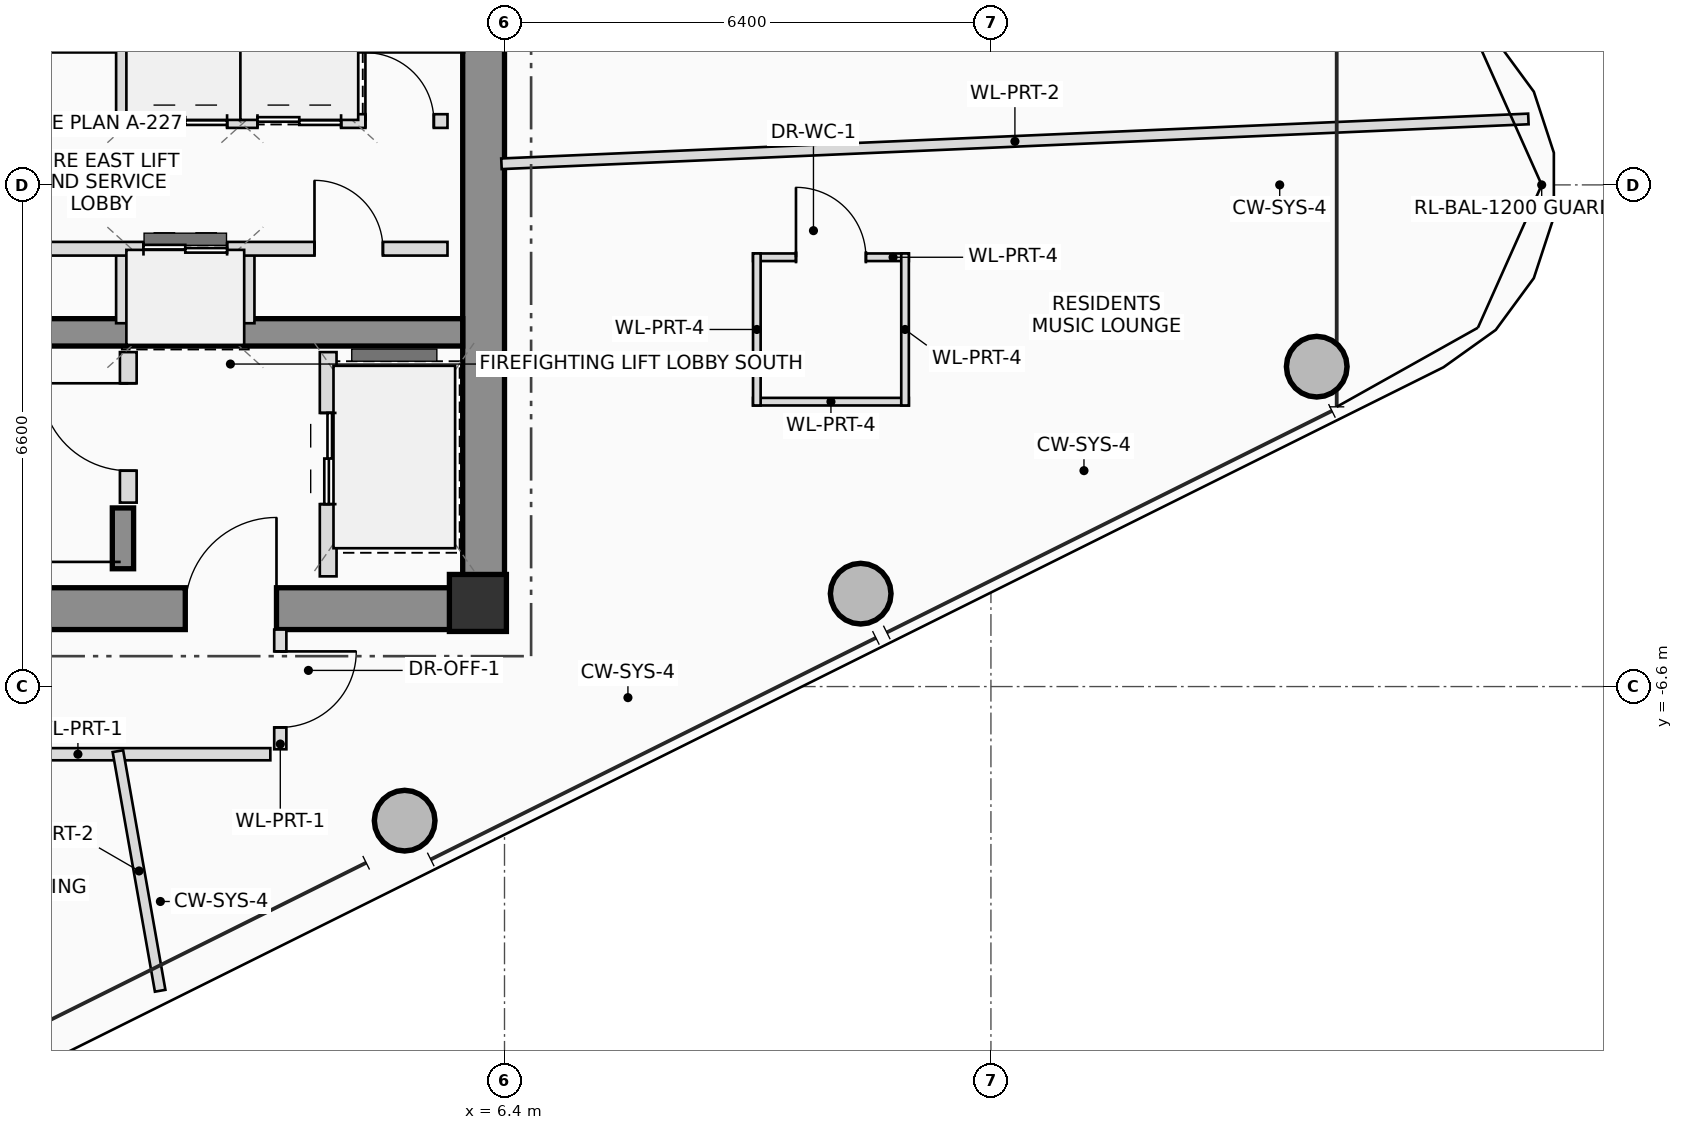
"""IFC4 building model, lengths in metres.
Left out: names, types, materials, properties, quantities, classifications, styles, units other than length and angle.
Written with IfcOpenShell. Run it as: python <this file> out.ifc"""

import sys

from ifc_helpers import new_model, si_unit, direction, frame, frame_2d, origin, origin_2d, place, context, subcontext, project, spatial, rectangle, hollow_circle, extrude, source, transform, mapped, element, fill, save


model = new_model("IFC4")
c1 = context("Model", 3, precision=1e-05, world=origin(), true_north=direction((0.0, 1.0)))
c2 = subcontext(c1, "Body", "Model", "MODEL_VIEW")
j1 = project(units=[si_unit("LENGTHUNIT", "METRE"), si_unit("PLANEANGLEUNIT", "RADIAN")], contexts=[c1])
p1 = place(None, origin())
s1 = spatial("IfcSite", under=j1, at=p1, CompositionType="ELEMENT")
p2 = place(p1, origin())
s2 = spatial("IfcBuilding", under=s1, at=p2, CompositionType="ELEMENT")
p3 = place(p2, frame((0.0, 0.0, 300.2)))
s3 = spatial("IfcBuildingStorey", under=s2, at=p3, CompositionType="ELEMENT", Elevation=300.2)
m1 = source(origin(), c2, "Body", "SweptSolid", [
    extrude(rectangle(XDim=0.75, YDim=0.75, at=origin_2d()), origin(), (0.0, 0.0, 1.0), 3.45),
])
p4 = place(p3, frame((6.05, -5.5, 0.0), z_axis=(0.0, 0.0, 1.0), x_axis=(1.0, 0.0, 0.0)))
e1 = element("IfcColumn", 1, at=p4, inside=s3, PredefinedType="COLUMN", context=c2, shape_type="MappedRepresentation", body=[
    mapped(m1, transform((0.0, 0.0, 0.0), scale=1.0)),
])
p5 = place(p3, frame((-6.4, -5.575, 0.0), z_axis=(0.0, 0.0, 1.0), x_axis=(1.0, 0.0, 0.0)))
e2 = element("IfcWall", 2, at=p5, inside=s3, PredefinedType="SHEAR", context=c2, shape_type="SweptSolid", body=[
    extrude(rectangle(XDim=12.8, YDim=0.55, at=frame_2d((6.4, 0.0))), origin(), (0.0, 0.0, 1.0), 3.45),
])
p6 = place(p5, frame((8.6, 0.0, 0.0)))
e3 = element("IfcOpeningElement", 3, at=p6, cuts=e2, PredefinedType="OPENING", context=c2, shape_type="SweptSolid", body=[
    extrude(rectangle(XDim=1.2, YDim=2.2, at=frame_2d((0.6, 1.1))), frame((0.0, 0.285, 0.0), z_axis=(0.0, -1.0, 0.0), x_axis=(1.0, 0.0, 0.0)), (0.0, 0.0, 1.0), 0.57),
])
p7 = place(p3, frame((6.125, -5.3, 0.0), z_axis=(0.0, 0.0, 1.0), x_axis=(0.0, 1.0, 0.0)))
e4 = element("IfcWall", 4, at=p7, inside=s3, PredefinedType="SHEAR", context=c2, shape_type="SweptSolid", body=[
    extrude(rectangle(XDim=10.6, YDim=0.55, at=frame_2d((5.3, 0.0))), origin(), (0.0, 0.0, 1.0), 3.45),
])
p8 = place(p3, frame((-5.85, -1.94, 0.0), z_axis=(0.0, 0.0, 1.0), x_axis=(1.0, 0.0, 0.0)))
e5 = element("IfcWall", 5, at=p8, inside=s3, PredefinedType="SHEAR", context=c2, shape_type="SweptSolid", body=[
    extrude(rectangle(XDim=11.7, YDim=0.36, at=frame_2d((5.85, 0.0))), origin(), (0.0, 0.0, 1.0), 3.45),
])
p9 = place(p3, frame((1.38, -5.05, 0.0), z_axis=(0.0, 0.0, 1.0), x_axis=(0.0, 1.0, 0.0)))
e6 = element("IfcWall", 6, at=p9, inside=s3, PredefinedType="SHEAR", context=c2, shape_type="SweptSolid", body=[
    extrude(rectangle(XDim=0.8, YDim=0.28, at=frame_2d((0.4, 0.0))), origin(), (0.0, 0.0, 1.0), 3.45),
])
m2 = source(origin(), c2, "Body", "SweptSolid", [
    extrude(hollow_circle(Radius=0.4, WallThickness=0.028, at=origin_2d()), origin(), (0.0, 0.0, 1.0), 3.45),
])
for number, where, z_axis, x_axis in (
    (7, (5.086, -8.364, 0.0), (0.0, 0.0, 1.0), (1.0, 0.0, 0.0)),
    (8, (11.086, -5.378, 0.0), (0.0, 0.0, 1.0), (1.0, 0.0, 0.0)),
    (9, (17.087, -2.392, 0.0), (0.0, 0.0, 1.0), (1.0, 0.0, 0.0)),
):
    element("IfcColumn", number, at=place(p3, frame(where, z_axis=z_axis, x_axis=x_axis)), inside=s3, PredefinedType="COLUMN", context=c2, shape_type="MappedRepresentation", body=[
        mapped(m2, transform((0.0, 0.0, 0.0), scale=1.0)),
    ])
p10 = place(p3, frame((1.45, -4.18, 0.0), z_axis=(0.0, 0.0, 1.0), x_axis=(0.0, 1.0, 0.0)))
e10 = element("IfcWall", 10, at=p10, inside=s3, PredefinedType="PLUMBINGWALL", context=c2, shape_type="SweptSolid", body=[
    extrude(rectangle(XDim=1.98, YDim=0.22, at=frame_2d((0.99, 0.0))), origin(), (0.0, 0.0, 1.0), 3.25),
])
p11 = place(p10, frame((0.42, 0.0, 0.0)))
e11 = element("IfcOpeningElement", 11, at=p11, cuts=e10, PredefinedType="OPENING", context=c2, shape_type="SweptSolid", body=[
    extrude(rectangle(XDim=1.15, YDim=2.15, at=frame_2d((0.575, 1.075))), frame((0.0, 0.12, 0.0), z_axis=(0.0, -1.0, 0.0), x_axis=(1.0, 0.0, 0.0)), (0.0, 0.0, 1.0), 0.24),
])
p12 = place(p3, frame((4.08, -5.15, 0.0), z_axis=(0.0, 0.0, 1.0), x_axis=(0.0, 1.0, 0.0)))
e12 = element("IfcWall", 12, at=p12, inside=s3, PredefinedType="PLUMBINGWALL", context=c2, shape_type="SweptSolid", body=[
    extrude(rectangle(XDim=2.95, YDim=0.22, at=frame_2d((1.475, 0.0))), origin(), (0.0, 0.0, 1.0), 3.25),
])
p13 = place(p12, frame((0.95, 0.0, 0.0)))
e13 = element("IfcOpeningElement", 13, at=p13, cuts=e12, PredefinedType="OPENING", context=c2, shape_type="SweptSolid", body=[
    extrude(rectangle(XDim=1.2, YDim=2.25, at=frame_2d((0.6, 1.125))), frame((0.0, 0.12, 0.0), z_axis=(0.0, -1.0, 0.0), x_axis=(1.0, 0.0, 0.0)), (0.0, 0.0, 1.0), 0.24),
])
for number, where, z_axis, x_axis in (
    (14, (1.38, 0.84, 0.0), (0.0, 0.0, 1.0), (0.0, 1.0, 0.0)),
    (15, (1.38, -1.82, 0.0), (0.0, 0.0, 1.0), (0.0, 1.0, 0.0)),
    (16, (3.02, 0.84, 0.0), (0.0, 0.0, 1.0), (0.0, 1.0, 0.0)),
    (17, (4.38, 0.84, 0.0), (0.0, 0.0, 1.0), (0.0, 1.0, 0.0)),
    (18, (3.02, -1.82, 0.0), (0.0, 0.0, 1.0), (0.0, 1.0, 0.0)),
):
    element("IfcWall", number, at=place(p3, frame(where, z_axis=z_axis, x_axis=x_axis)), inside=s3, PredefinedType="PLUMBINGWALL", context=c2, shape_type="SweptSolid", body=[
        extrude(rectangle(XDim=0.98, YDim=0.18, at=frame_2d((0.49, 0.0))), origin(), (0.0, 0.0, 1.0), 3.25),
    ])
p14 = place(p3, frame((-5.68, 0.84, 0.0), z_axis=(0.0, 0.0, 1.0), x_axis=(1.0, 0.0, 0.0)))
e19 = element("IfcWall", 19, at=p14, inside=s3, PredefinedType="PLUMBINGWALL", context=c2, shape_type="SweptSolid", body=[
    extrude(rectangle(XDim=11.33, YDim=0.18, at=frame_2d((5.665, 0.0))), origin(), (0.0, 0.0, 1.0), 3.25),
])
p15 = place(p14, frame((3.13, 0.0, 0.0)))
e20 = element("IfcOpeningElement", 20, at=p15, cuts=e19, PredefinedType="OPENING", context=c2, shape_type="SweptSolid", body=[
    extrude(rectangle(XDim=0.9, YDim=2.05, at=frame_2d((0.45, 1.025))), frame((0.0, 0.1, 0.0), z_axis=(0.0, -1.0, 0.0), x_axis=(1.0, 0.0, 0.0)), (0.0, 0.0, 1.0), 0.2),
])
p16 = place(p14, frame((7.33, 0.0, 0.0)))
e21 = element("IfcOpeningElement", 21, at=p16, cuts=e19, PredefinedType="OPENING", context=c2, shape_type="SweptSolid", body=[
    extrude(rectangle(XDim=1.1, YDim=2.2, at=frame_2d((0.55, 1.1))), frame((0.0, 0.1, 0.0), z_axis=(0.0, -1.0, 0.0), x_axis=(1.0, 0.0, 0.0)), (0.0, 0.0, 1.0), 0.2),
])
p17 = place(p14, frame((8.83, 0.0, 0.0)))
e22 = element("IfcOpeningElement", 22, at=p17, cuts=e19, PredefinedType="OPENING", context=c2, shape_type="SweptSolid", body=[
    extrude(rectangle(XDim=1.1, YDim=2.2, at=frame_2d((0.55, 1.1))), frame((0.0, 0.1, 0.0), z_axis=(0.0, -1.0, 0.0), x_axis=(1.0, 0.0, 0.0)), (0.0, 0.0, 1.0), 0.2),
])
p18 = place(p14, frame((10.25, 0.0, 0.0)))
e23 = element("IfcOpeningElement", 23, at=p18, cuts=e19, PredefinedType="OPENING", context=c2, shape_type="SweptSolid", body=[
    extrude(rectangle(XDim=0.9, YDim=2.05, at=frame_2d((0.45, 1.025))), frame((0.0, 0.1, 0.0), z_axis=(0.0, -1.0, 0.0), x_axis=(1.0, 0.0, 0.0)), (0.0, 0.0, 1.0), 0.2),
])
p19 = place(p3, frame((-5.68, -0.84, 0.0), z_axis=(0.0, 0.0, 1.0), x_axis=(1.0, 0.0, 0.0)))
e24 = element("IfcWall", 24, at=p19, inside=s3, PredefinedType="PLUMBINGWALL", context=c2, shape_type="SweptSolid", body=[
    extrude(rectangle(XDim=11.33, YDim=0.18, at=frame_2d((5.665, 0.0))), origin(), (0.0, 0.0, 1.0), 3.25),
])
p20 = place(p19, frame((3.13, 0.0, 0.0)))
e25 = element("IfcOpeningElement", 25, at=p20, cuts=e24, PredefinedType="OPENING", context=c2, shape_type="SweptSolid", body=[
    extrude(rectangle(XDim=0.9, YDim=2.05, at=frame_2d((0.45, 1.025))), frame((0.0, 0.1, 0.0), z_axis=(0.0, -1.0, 0.0), x_axis=(1.0, 0.0, 0.0)), (0.0, 0.0, 1.0), 0.2),
])
p21 = place(p19, frame((7.33, 0.0, 0.0)))
e26 = element("IfcOpeningElement", 26, at=p21, cuts=e24, PredefinedType="OPENING", context=c2, shape_type="SweptSolid", body=[
    extrude(rectangle(XDim=1.1, YDim=2.2, at=frame_2d((0.55, 1.1))), frame((0.0, 0.1, 0.0), z_axis=(0.0, -1.0, 0.0), x_axis=(1.0, 0.0, 0.0)), (0.0, 0.0, 1.0), 0.2),
])
p22 = place(p19, frame((9.58, 0.0, 0.0)))
e27 = element("IfcOpeningElement", 27, at=p22, cuts=e24, PredefinedType="OPENING", context=c2, shape_type="SweptSolid", body=[
    extrude(rectangle(XDim=0.9, YDim=2.05, at=frame_2d((0.45, 1.025))), frame((0.0, 0.1, 0.0), z_axis=(0.0, -1.0, 0.0), x_axis=(1.0, 0.0, 0.0)), (0.0, 0.0, 1.0), 0.2),
])
p23 = place(p3, frame((9.67, -0.952, 0.0), z_axis=(0.0, 0.0, 1.0), x_axis=(1.0, 0.0, 0.0)))
e28 = element("IfcWall", 28, at=p23, inside=s3, PredefinedType="PARTITIONING", context=c2, shape_type="SweptSolid", body=[
    extrude(rectangle(XDim=2.05, YDim=0.1, at=frame_2d((1.025, 0.0))), origin(), (0.0, 0.0, 1.0), 2.905),
])
p24 = place(p23, frame((0.565, 0.0, 0.0)))
e29 = element("IfcOpeningElement", 29, at=p24, cuts=e28, PredefinedType="OPENING", context=c2, shape_type="SweptSolid", body=[
    extrude(rectangle(XDim=0.92, YDim=2.1, at=frame_2d((0.46, 1.05))), frame((0.0, 0.06, 0.0), z_axis=(0.0, -1.0, 0.0), x_axis=(1.0, 0.0, 0.0)), (0.0, 0.0, 1.0), 0.12),
])
p25 = place(p3, frame((11.72, -2.852, 0.0), z_axis=(0.0, 0.0, 1.0), x_axis=(-1.0, 0.0, 0.0)))
e30 = element("IfcWall", 30, at=p25, inside=s3, PredefinedType="PARTITIONING", context=c2, shape_type="SweptSolid", body=[
    extrude(rectangle(XDim=2.05, YDim=0.1, at=frame_2d((1.025, 0.0))), origin(), (0.0, 0.0, 1.0), 2.905),
])
for number, where, z_axis, x_axis in (
    (31, (11.67, -0.902, 0.0), (0.0, 0.0, 1.0), (0.0, -1.0, 0.0)),
    (32, (9.72, -2.902, 0.0), (0.0, 0.0, 1.0), (0.0, 1.0, 0.0)),
):
    element("IfcWall", number, at=place(p3, frame(where, z_axis=z_axis, x_axis=x_axis)), inside=s3, PredefinedType="PARTITIONING", context=c2, shape_type="SweptSolid", body=[
        extrude(rectangle(XDim=2.0, YDim=0.1, at=frame_2d((1.0, 0.0))), origin(), (0.0, 0.0, 1.0), 3.25),
    ])
p26 = place(p3, frame((3.45, -5.85, 0.0), z_axis=(0.0, 0.0, 1.0), x_axis=(0.0, -1.0, 0.0)))
e33 = element("IfcWall", 33, at=p26, inside=s3, PredefinedType="PARTITIONING", context=c2, shape_type="SweptSolid", body=[
    extrude(rectangle(XDim=1.575, YDim=0.16, at=frame_2d((0.787, 0.0))), origin(), (0.0, 0.0, 1.0), 2.855),
])
p27 = place(p26, frame((0.287, 0.0, 0.0)))
e34 = element("IfcOpeningElement", 34, at=p27, cuts=e33, PredefinedType="OPENING", context=c2, shape_type="SweptSolid", body=[
    extrude(rectangle(XDim=1.0, YDim=2.25, at=frame_2d((0.5, 1.125))), frame((0.0, 0.09, 0.0), z_axis=(0.0, -1.0, 0.0), x_axis=(1.0, 0.0, 0.0)), (0.0, 0.0, 1.0), 0.18),
])
p28 = place(p3, frame((3.319, -7.49, 0.0), z_axis=(0.0, 0.0, 1.0), x_axis=(-1.0, 0.0, 0.0)))
e35 = element("IfcWall", 35, at=p28, inside=s3, PredefinedType="PARTITIONING", context=c2, shape_type="SweptSolid", body=[
    extrude(rectangle(XDim=9.679, YDim=0.16, at=frame_2d((4.84, 0.0))), origin(), (0.0, 0.0, 1.0), 2.655),
])
p29 = place(p28, frame((5.213, 0.0, 0.0)))
e36 = element("IfcOpeningElement", 36, at=p29, cuts=e35, PredefinedType="OPENING", context=c2, shape_type="SweptSolid", body=[
    extrude(rectangle(XDim=1.05, YDim=2.2, at=frame_2d((0.525, 1.1))), frame((0.0, 0.09, 0.0), z_axis=(0.0, -1.0, 0.0), x_axis=(1.0, 0.0, 0.0)), (0.0, 0.0, 1.0), 0.18),
])
p30 = place(p3, frame((6.36, 0.278, 0.0), z_axis=(0.0, 0.0, 1.0), x_axis=(0.999047623791, 0.043633076864, 0.0)))
e37 = element("IfcWall", 37, at=p30, inside=s3, PredefinedType="PARTITIONING", context=c2, shape_type="SweptSolid", body=[
    extrude(rectangle(XDim=13.524, YDim=0.14, at=frame_2d((6.762, 0.0))), origin(), (0.0, 0.0, 1.0), 2.815),
])
p31 = place(p3, frame((1.314, -7.45, 0.0), z_axis=(0.0, 0.0, 1.0), x_axis=(0.173619966433, -0.984812726997, 0.0)))
e38 = element("IfcWall", 38, at=p31, inside=s3, PredefinedType="PARTITIONING", context=c2, shape_type="SweptSolid", body=[
    extrude(rectangle(XDim=3.2, YDim=0.14, at=frame_2d((1.6, 0.0))), origin(), (0.0, 0.0, 1.0), 2.815),
])
p32 = place(p6, origin())
e39 = element("IfcDoor", 39, at=p32, inside=s3, OperationType="SINGLE_SWING_RIGHT", PredefinedType="DOOR", context=c2, shape_type="SweptSolid", body=[
    extrude(rectangle(XDim=1.2, YDim=2.2, at=frame_2d((0.6, 1.1))), frame((0.0, 0.025, 0.0), z_axis=(0.0, -1.0, 0.0), x_axis=(1.0, 0.0, 0.0)), (0.0, 0.0, 1.0), 0.05),
])
fill(e3, e39)
p33 = place(p11, origin())
e40 = element("IfcDoor", 40, at=p33, inside=s3, OperationType="SINGLE_SWING_RIGHT", PredefinedType="DOOR", context=c2, shape_type="SweptSolid", body=[
    extrude(rectangle(XDim=1.15, YDim=2.15, at=frame_2d((0.575, 1.075))), frame((0.0, 0.025, 0.0), z_axis=(0.0, -1.0, 0.0), x_axis=(1.0, 0.0, 0.0)), (0.0, 0.0, 1.0), 0.05),
])
fill(e11, e40)
p34 = place(p13, origin())
e41 = element("IfcDoor", 41, at=p34, inside=s3, OperationType="DOUBLE_DOOR_SLIDING", PredefinedType="DOOR", context=c2, shape_type="SweptSolid", body=[
    extrude(rectangle(XDim=1.2, YDim=2.25, at=frame_2d((0.6, 1.125))), frame((0.0, 0.025, 0.0), z_axis=(0.0, -1.0, 0.0), x_axis=(1.0, 0.0, 0.0)), (0.0, 0.0, 1.0), 0.05),
])
fill(e13, e41)
p35 = place(p16, origin())
e42 = element("IfcDoor", 42, at=p35, inside=s3, OperationType="DOUBLE_DOOR_SLIDING", PredefinedType="DOOR", context=c2, shape_type="SweptSolid", body=[
    extrude(rectangle(XDim=1.1, YDim=2.2, at=frame_2d((0.55, 1.1))), frame((0.0, 0.025, 0.0), z_axis=(0.0, -1.0, 0.0), x_axis=(1.0, 0.0, 0.0)), (0.0, 0.0, 1.0), 0.05),
])
fill(e21, e42)
p36 = place(p17, origin())
e43 = element("IfcDoor", 43, at=p36, inside=s3, OperationType="DOUBLE_DOOR_SLIDING", PredefinedType="DOOR", context=c2, shape_type="SweptSolid", body=[
    extrude(rectangle(XDim=1.1, YDim=2.2, at=frame_2d((0.55, 1.1))), frame((0.0, 0.025, 0.0), z_axis=(0.0, -1.0, 0.0), x_axis=(1.0, 0.0, 0.0)), (0.0, 0.0, 1.0), 0.05),
])
fill(e22, e43)
p37 = place(p18, origin())
e44 = element("IfcDoor", 44, at=p37, inside=s3, OperationType="SINGLE_SWING_LEFT", PredefinedType="DOOR", context=c2, shape_type="SweptSolid", body=[
    extrude(rectangle(XDim=0.9, YDim=2.05, at=frame_2d((0.45, 1.025))), frame((0.0, 0.025, 0.0), z_axis=(0.0, -1.0, 0.0), x_axis=(1.0, 0.0, 0.0)), (0.0, 0.0, 1.0), 0.05),
])
fill(e23, e44)
p38 = place(p21, origin())
e45 = element("IfcDoor", 45, at=p38, inside=s3, OperationType="DOUBLE_DOOR_SLIDING", PredefinedType="DOOR", context=c2, shape_type="SweptSolid", body=[
    extrude(rectangle(XDim=1.1, YDim=2.2, at=frame_2d((0.55, 1.1))), frame((0.0, 0.025, 0.0), z_axis=(0.0, -1.0, 0.0), x_axis=(1.0, 0.0, 0.0)), (0.0, 0.0, 1.0), 0.05),
])
fill(e26, e45)
p39 = place(p22, origin())
e46 = element("IfcDoor", 46, at=p39, inside=s3, OperationType="SINGLE_SWING_LEFT", PredefinedType="DOOR", context=c2, shape_type="SweptSolid", body=[
    extrude(rectangle(XDim=0.9, YDim=2.05, at=frame_2d((0.45, 1.025))), frame((0.0, 0.025, 0.0), z_axis=(0.0, -1.0, 0.0), x_axis=(1.0, 0.0, 0.0)), (0.0, 0.0, 1.0), 0.05),
])
fill(e27, e46)
p40 = place(p24, origin())
e47 = element("IfcDoor", 47, at=p40, inside=s3, OperationType="SINGLE_SWING_LEFT", PredefinedType="DOOR", context=c2, shape_type="SweptSolid", body=[
    extrude(rectangle(XDim=0.92, YDim=2.1, at=frame_2d((0.46, 1.05))), frame((0.0, 0.025, 0.0), z_axis=(0.0, -1.0, 0.0), x_axis=(1.0, 0.0, 0.0)), (0.0, 0.0, 1.0), 0.05),
])
fill(e29, e47)
p41 = place(p27, origin())
e48 = element("IfcDoor", 48, at=p41, inside=s3, OperationType="SINGLE_SWING_LEFT", PredefinedType="DOOR", context=c2, shape_type="SweptSolid", body=[
    extrude(rectangle(XDim=1.0, YDim=2.25, at=frame_2d((0.5, 1.125))), frame((0.0, 0.025, 0.0), z_axis=(0.0, -1.0, 0.0), x_axis=(1.0, 0.0, 0.0)), (0.0, 0.0, 1.0), 0.05),
])
fill(e34, e48)
save(model, sys.argv[1])
